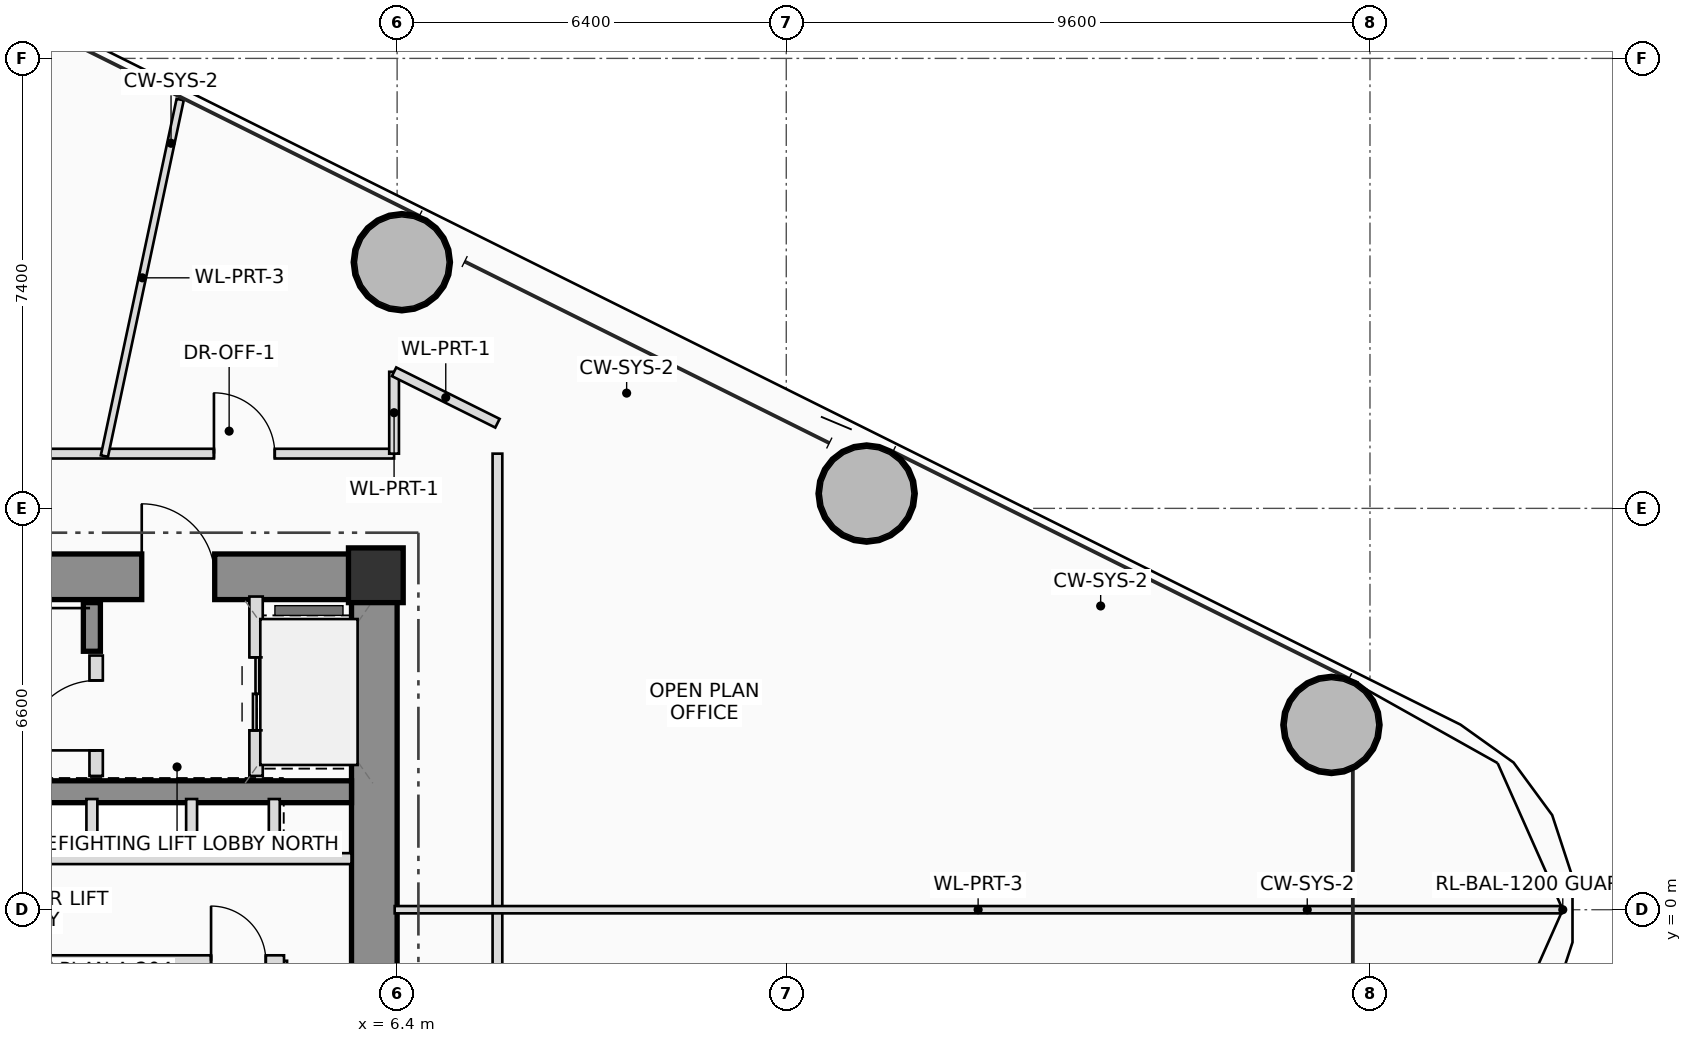
"""IFC4 building model, lengths in metres.
Left out: names, types, materials, properties, quantities, classifications, styles, units other than length and angle.
Written with IfcOpenShell. Run it as: python <this file> out.ifc"""

import sys

from ifc_helpers import new_model, si_unit, direction, frame, frame_2d, origin, origin_2d, place, context, subcontext, project, spatial, rectangle, hollow_circle, extrude, source, transform, mapped, element, fill, save


model = new_model("IFC4")
c1 = context("Model", 3, precision=1e-05, world=origin(), true_north=direction((0.0, 1.0)))
c2 = subcontext(c1, "Body", "Model", "MODEL_VIEW")
j1 = project(units=[si_unit("LENGTHUNIT", "METRE"), si_unit("PLANEANGLEUNIT", "RADIAN")], contexts=[c1])
p1 = place(None, origin())
s1 = spatial("IfcSite", under=j1, at=p1, CompositionType="ELEMENT")
p2 = place(p1, origin())
s2 = spatial("IfcBuilding", under=s1, at=p2, CompositionType="ELEMENT")
p3 = place(p2, frame((0.0, 0.0, 23.8)))
s3 = spatial("IfcBuildingStorey", under=s2, at=p3, CompositionType="ELEMENT", Elevation=23.8)
m1 = source(origin(), c2, "Body", "SweptSolid", [
    extrude(rectangle(XDim=0.9, YDim=0.9, at=origin_2d()), origin(), (0.0, 0.0, 1.0), 3.7),
])
p4 = place(p3, frame((6.05, 5.5, 0.0), z_axis=(0.0, 0.0, 1.0), x_axis=(1.0, 0.0, 0.0)))
e1 = element("IfcColumn", 1, at=p4, inside=s3, PredefinedType="COLUMN", context=c2, shape_type="MappedRepresentation", body=[
    mapped(m1, transform((0.0, 0.0, 0.0), scale=1.0)),
])
p5 = place(p3, frame((-6.4, 5.475, 0.0), z_axis=(0.0, 0.0, 1.0), x_axis=(1.0, 0.0, 0.0)))
e2 = element("IfcWall", 2, at=p5, inside=s3, PredefinedType="SHEAR", context=c2, shape_type="SweptSolid", body=[
    extrude(rectangle(XDim=12.8, YDim=0.75, at=frame_2d((6.4, 0.0))), origin(), (0.0, 0.0, 1.0), 3.7),
])
p6 = place(p5, frame((8.6, 0.0, 0.0)))
e3 = element("IfcOpeningElement", 3, at=p6, cuts=e2, PredefinedType="OPENING", context=c2, shape_type="SweptSolid", body=[
    extrude(rectangle(XDim=1.2, YDim=2.2, at=frame_2d((0.6, 1.1))), frame((0.0, 0.385, 0.0), z_axis=(0.0, -1.0, 0.0), x_axis=(1.0, 0.0, 0.0)), (0.0, 0.0, 1.0), 0.77),
])
p7 = place(p3, frame((6.025, -5.1, 0.0), z_axis=(0.0, 0.0, 1.0), x_axis=(0.0, 1.0, 0.0)))
e4 = element("IfcWall", 4, at=p7, inside=s3, PredefinedType="SHEAR", context=c2, shape_type="SweptSolid", body=[
    extrude(rectangle(XDim=10.2, YDim=0.75, at=frame_2d((5.1, 0.0))), origin(), (0.0, 0.0, 1.0), 3.7),
])
p8 = place(p3, frame((-5.65, 1.94, 0.0), z_axis=(0.0, 0.0, 1.0), x_axis=(1.0, 0.0, 0.0)))
e5 = element("IfcWall", 5, at=p8, inside=s3, PredefinedType="SHEAR", context=c2, shape_type="SweptSolid", body=[
    extrude(rectangle(XDim=11.3, YDim=0.36, at=frame_2d((5.65, 0.0))), origin(), (0.0, 0.0, 1.0), 3.7),
])
p9 = place(p3, frame((1.38, 4.25, 0.0), z_axis=(0.0, 0.0, 1.0), x_axis=(0.0, 1.0, 0.0)))
e6 = element("IfcWall", 6, at=p9, inside=s3, PredefinedType="SHEAR", context=c2, shape_type="SweptSolid", body=[
    extrude(rectangle(XDim=0.8, YDim=0.28, at=frame_2d((0.4, 0.0))), origin(), (0.0, 0.0, 1.0), 3.7),
])
m2 = source(origin(), c2, "Body", "SweptSolid", [
    extrude(hollow_circle(Radius=0.8, WallThickness=0.055, at=origin_2d()), origin(), (0.0, 0.0, 1.0), 3.7),
])
for number, where, z_axis, x_axis in (
    (7, (21.766, 3.039, 0.0), (0.0, 0.0, 1.0), (1.0, 0.0, 0.0)),
    (8, (14.122, 6.844, 0.0), (0.0, 0.0, 1.0), (1.0, 0.0, 0.0)),
    (9, (6.477, 10.648, 0.0), (0.0, 0.0, 1.0), (1.0, 0.0, 0.0)),
):
    element("IfcColumn", number, at=place(p3, frame(where, z_axis=z_axis, x_axis=x_axis)), inside=s3, PredefinedType="COLUMN", context=c2, shape_type="MappedRepresentation", body=[
        mapped(m2, transform((0.0, 0.0, 0.0), scale=1.0)),
    ])
p10 = place(p3, frame((1.45, 2.2, 0.0), z_axis=(0.0, 0.0, 1.0), x_axis=(0.0, 1.0, 0.0)))
e10 = element("IfcWall", 10, at=p10, inside=s3, PredefinedType="PLUMBINGWALL", context=c2, shape_type="SweptSolid", body=[
    extrude(rectangle(XDim=1.98, YDim=0.22, at=frame_2d((0.99, 0.0))), origin(), (0.0, 0.0, 1.0), 3.495),
])
p11 = place(p10, frame((0.42, 0.0, 0.0)))
e11 = element("IfcOpeningElement", 11, at=p11, cuts=e10, PredefinedType="OPENING", context=c2, shape_type="SweptSolid", body=[
    extrude(rectangle(XDim=1.15, YDim=2.15, at=frame_2d((0.575, 1.075))), frame((0.0, 0.12, 0.0), z_axis=(0.0, -1.0, 0.0), x_axis=(1.0, 0.0, 0.0)), (0.0, 0.0, 1.0), 0.24),
])
p12 = place(p3, frame((4.08, 2.2, 0.0), z_axis=(0.0, 0.0, 1.0), x_axis=(0.0, 1.0, 0.0)))
e12 = element("IfcWall", 12, at=p12, inside=s3, PredefinedType="PLUMBINGWALL", context=c2, shape_type="SweptSolid", body=[
    extrude(rectangle(XDim=2.95, YDim=0.22, at=frame_2d((1.475, 0.0))), origin(), (0.0, 0.0, 1.0), 3.495),
])
p13 = place(p12, frame((0.75, 0.0, 0.0)))
e13 = element("IfcOpeningElement", 13, at=p13, cuts=e12, PredefinedType="OPENING", context=c2, shape_type="SweptSolid", body=[
    extrude(rectangle(XDim=1.2, YDim=2.25, at=frame_2d((0.6, 1.125))), frame((0.0, 0.12, 0.0), z_axis=(0.0, -1.0, 0.0), x_axis=(1.0, 0.0, 0.0)), (0.0, 0.0, 1.0), 0.24),
])
for number, where, z_axis, x_axis in (
    (14, (1.38, 0.84, 0.0), (0.0, 0.0, 1.0), (0.0, 1.0, 0.0)),
    (15, (1.38, -1.82, 0.0), (0.0, 0.0, 1.0), (0.0, 1.0, 0.0)),
    (16, (3.02, 0.84, 0.0), (0.0, 0.0, 1.0), (0.0, 1.0, 0.0)),
    (17, (4.38, 0.84, 0.0), (0.0, 0.0, 1.0), (0.0, 1.0, 0.0)),
    (18, (3.02, -1.82, 0.0), (0.0, 0.0, 1.0), (0.0, 1.0, 0.0)),
):
    element("IfcWall", number, at=place(p3, frame(where, z_axis=z_axis, x_axis=x_axis)), inside=s3, PredefinedType="PLUMBINGWALL", context=c2, shape_type="SweptSolid", body=[
        extrude(rectangle(XDim=0.98, YDim=0.18, at=frame_2d((0.49, 0.0))), origin(), (0.0, 0.0, 1.0), 3.495),
    ])
p14 = place(p3, frame((4.54, -1.82, 0.0), z_axis=(0.0, 0.0, 1.0), x_axis=(0.0, 1.0, 0.0)))
e19 = element("IfcWall", 19, at=p14, inside=s3, PredefinedType="PARTITIONING", context=c2, shape_type="SweptSolid", body=[
    extrude(rectangle(XDim=0.98, YDim=0.1, at=frame_2d((0.49, 0.0))), origin(), (0.0, 0.0, 1.0), 3.495),
])
p15 = place(p3, frame((-5.68, 0.84, 0.0), z_axis=(0.0, 0.0, 1.0), x_axis=(1.0, 0.0, 0.0)))
e20 = element("IfcWall", 20, at=p15, inside=s3, PredefinedType="PLUMBINGWALL", context=c2, shape_type="SweptSolid", body=[
    extrude(rectangle(XDim=11.33, YDim=0.18, at=frame_2d((5.665, 0.0))), origin(), (0.0, 0.0, 1.0), 3.495),
])
p16 = place(p15, frame((0.43, 0.0, 0.0)))
e21 = element("IfcOpeningElement", 21, at=p16, cuts=e20, PredefinedType="OPENING", context=c2, shape_type="SweptSolid", body=[
    extrude(rectangle(XDim=1.1, YDim=2.2, at=frame_2d((0.55, 1.1))), frame((0.0, 0.1, 0.0), z_axis=(0.0, -1.0, 0.0), x_axis=(1.0, 0.0, 0.0)), (0.0, 0.0, 1.0), 0.2),
])
p17 = place(p15, frame((2.13, 0.0, 0.0)))
e22 = element("IfcOpeningElement", 22, at=p17, cuts=e20, PredefinedType="OPENING", context=c2, shape_type="SweptSolid", body=[
    extrude(rectangle(XDim=1.1, YDim=2.2, at=frame_2d((0.55, 1.1))), frame((0.0, 0.1, 0.0), z_axis=(0.0, -1.0, 0.0), x_axis=(1.0, 0.0, 0.0)), (0.0, 0.0, 1.0), 0.2),
])
p18 = place(p3, frame((-5.68, -0.84, 0.0), z_axis=(0.0, 0.0, 1.0), x_axis=(1.0, 0.0, 0.0)))
e23 = element("IfcWall", 23, at=p18, inside=s3, PredefinedType="PLUMBINGWALL", context=c2, shape_type="SweptSolid", body=[
    extrude(rectangle(XDim=10.22, YDim=0.18, at=frame_2d((5.11, 0.0))), origin(), (0.0, 0.0, 1.0), 3.495),
])
p19 = place(p18, frame((0.43, 0.0, 0.0)))
e24 = element("IfcOpeningElement", 24, at=p19, cuts=e23, PredefinedType="OPENING", context=c2, shape_type="SweptSolid", body=[
    extrude(rectangle(XDim=1.1, YDim=2.2, at=frame_2d((0.55, 1.1))), frame((0.0, 0.1, 0.0), z_axis=(0.0, -1.0, 0.0), x_axis=(1.0, 0.0, 0.0)), (0.0, 0.0, 1.0), 0.2),
])
p20 = place(p18, frame((2.13, 0.0, 0.0)))
e25 = element("IfcOpeningElement", 25, at=p20, cuts=e23, PredefinedType="OPENING", context=c2, shape_type="SweptSolid", body=[
    extrude(rectangle(XDim=1.1, YDim=2.2, at=frame_2d((0.55, 1.1))), frame((0.0, 0.1, 0.0), z_axis=(0.0, -1.0, 0.0), x_axis=(1.0, 0.0, 0.0)), (0.0, 0.0, 1.0), 0.2),
])
p21 = place(p18, frame((9.02, 0.0, 0.0)))
e26 = element("IfcOpeningElement", 26, at=p21, cuts=e23, PredefinedType="OPENING", context=c2, shape_type="SweptSolid", body=[
    extrude(rectangle(XDim=0.9, YDim=2.05, at=frame_2d((0.45, 1.025))), frame((0.0, 0.1, 0.0), z_axis=(0.0, -1.0, 0.0), x_axis=(1.0, 0.0, 0.0)), (0.0, 0.0, 1.0), 0.2),
])
p22 = place(p3, frame((-6.35, 7.5, 0.0), z_axis=(0.0, 0.0, 1.0), x_axis=(1.0, 0.0, 0.0)))
e27 = element("IfcWall", 27, at=p22, inside=s3, PredefinedType="PARTITIONING", context=c2, shape_type="SweptSolid", body=[
    extrude(rectangle(XDim=12.7, YDim=0.16, at=frame_2d((6.35, 0.0))), origin(), (0.0, 0.0, 1.0), 2.8),
])
p23 = place(p22, frame((9.737, 0.0, 0.0)))
e28 = element("IfcOpeningElement", 28, at=p23, cuts=e27, PredefinedType="OPENING", context=c2, shape_type="SweptSolid", body=[
    extrude(rectangle(XDim=1.0, YDim=2.25, at=frame_2d((0.5, 1.125))), frame((0.0, 0.09, 0.0), z_axis=(0.0, -1.0, 0.0), x_axis=(1.0, 0.0, 0.0)), (0.0, 0.0, 1.0), 0.18),
])
p24 = place(p3, frame((6.35, 7.5, 0.0), z_axis=(0.0, 0.0, 1.0), x_axis=(0.0, 1.0, 0.0)))
e29 = element("IfcWall", 29, at=p24, inside=s3, PredefinedType="PARTITIONING", context=c2, shape_type="SweptSolid", body=[
    extrude(rectangle(XDim=1.346, YDim=0.16, at=frame_2d((0.673, 0.0))), origin(), (0.0, 0.0, 1.0), 2.8),
])
p25 = place(p3, frame((6.35, 8.846, 0.0), z_axis=(0.0, 0.0, 1.0), x_axis=(0.895274181873, -0.445515588136, 0.0)))
e30 = element("IfcWall", 30, at=p25, inside=s3, PredefinedType="PARTITIONING", context=c2, shape_type="SweptSolid", body=[
    extrude(rectangle(XDim=1.899, YDim=0.16, at=frame_2d((0.949, 0.0))), origin(), (0.0, 0.0, 1.0), 2.8),
])
for number, where, z_axis, x_axis in (
    (31, (8.05, 7.5, 0.0), (0.0, 0.0, 1.0), (0.0, -1.0, 0.0)),
    (32, (8.05, -0.02, 0.0), (0.0, 0.0, 1.0), (0.0, -1.0, 0.0)),
):
    element("IfcWall", number, at=place(p3, frame(where, z_axis=z_axis, x_axis=x_axis)), inside=s3, PredefinedType="PARTITIONING", context=c2, shape_type="SweptSolid", body=[
        extrude(rectangle(XDim=7.48, YDim=0.16, at=frame_2d((3.74, 0.0))), origin(), (0.0, 0.0, 1.0), 2.8),
    ])
p26 = place(p3, frame((6.36, 0.0, 0.0), z_axis=(0.0, 0.0, 1.0), x_axis=(1.0, 0.0, 0.0)))
e33 = element("IfcWall", 33, at=p26, inside=s3, PredefinedType="PARTITIONING", context=c2, shape_type="SweptSolid", body=[
    extrude(rectangle(XDim=19.191, YDim=0.12, at=frame_2d((9.595, 0.0))), origin(), (0.0, 0.0, 1.0), 2.96),
])
p27 = place(p3, frame((1.586, 7.46, 0.0), z_axis=(0.0, 0.0, 1.0), x_axis=(0.207898702609, 0.978150361373, 0.0)))
e34 = element("IfcWall", 34, at=p27, inside=s3, PredefinedType="PARTITIONING", context=c2, shape_type="SweptSolid", body=[
    extrude(rectangle(XDim=5.994, YDim=0.12, at=frame_2d((2.997, 0.0))), origin(), (0.0, 0.0, 1.0), 2.96),
])
p28 = place(p6, origin())
e35 = element("IfcDoor", 35, at=p28, inside=s3, OperationType="SINGLE_SWING_LEFT", PredefinedType="DOOR", context=c2, shape_type="SweptSolid", body=[
    extrude(rectangle(XDim=1.2, YDim=2.2, at=frame_2d((0.6, 1.1))), frame((0.0, 0.025, 0.0), z_axis=(0.0, -1.0, 0.0), x_axis=(1.0, 0.0, 0.0)), (0.0, 0.0, 1.0), 0.05),
])
fill(e3, e35)
p29 = place(p11, origin())
e36 = element("IfcDoor", 36, at=p29, inside=s3, OperationType="SINGLE_SWING_LEFT", PredefinedType="DOOR", context=c2, shape_type="SweptSolid", body=[
    extrude(rectangle(XDim=1.15, YDim=2.15, at=frame_2d((0.575, 1.075))), frame((0.0, 0.025, 0.0), z_axis=(0.0, -1.0, 0.0), x_axis=(1.0, 0.0, 0.0)), (0.0, 0.0, 1.0), 0.05),
])
fill(e11, e36)
p30 = place(p13, origin())
e37 = element("IfcDoor", 37, at=p30, inside=s3, OperationType="DOUBLE_DOOR_SLIDING", PredefinedType="DOOR", context=c2, shape_type="SweptSolid", body=[
    extrude(rectangle(XDim=1.2, YDim=2.25, at=frame_2d((0.6, 1.125))), frame((0.0, 0.025, 0.0), z_axis=(0.0, -1.0, 0.0), x_axis=(1.0, 0.0, 0.0)), (0.0, 0.0, 1.0), 0.05),
])
fill(e13, e37)
p31 = place(p21, origin())
e38 = element("IfcDoor", 38, at=p31, inside=s3, OperationType="SINGLE_SWING_LEFT", PredefinedType="DOOR", context=c2, shape_type="SweptSolid", body=[
    extrude(rectangle(XDim=0.9, YDim=2.05, at=frame_2d((0.45, 1.025))), frame((0.0, 0.025, 0.0), z_axis=(0.0, -1.0, 0.0), x_axis=(1.0, 0.0, 0.0)), (0.0, 0.0, 1.0), 0.05),
])
fill(e26, e38)
p32 = place(p23, origin())
e39 = element("IfcDoor", 39, at=p32, inside=s3, OperationType="SINGLE_SWING_LEFT", PredefinedType="DOOR", context=c2, shape_type="SweptSolid", body=[
    extrude(rectangle(XDim=1.0, YDim=2.25, at=frame_2d((0.5, 1.125))), frame((0.0, 0.025, 0.0), z_axis=(0.0, -1.0, 0.0), x_axis=(1.0, 0.0, 0.0)), (0.0, 0.0, 1.0), 0.05),
])
fill(e28, e39)
save(model, sys.argv[1])
